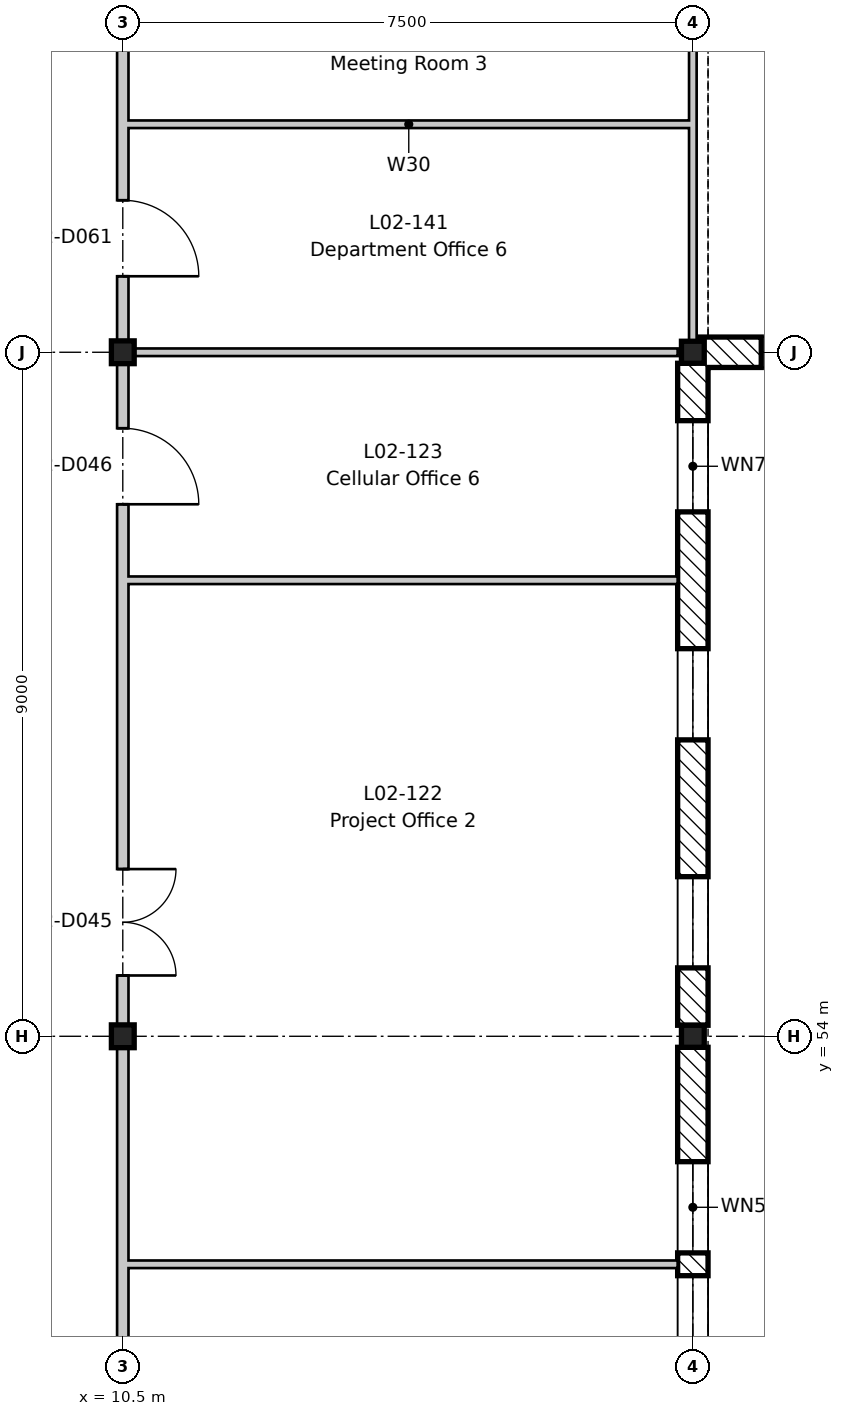
"""IFC4 building model, lengths in metres.
Left out: names, types, materials, properties, quantities, classifications, styles, units other than length and angle.
Written with IfcOpenShell. Run it as: python <this file> out.ifc"""

import sys

from ifc_helpers import new_model, si_unit, direction, frame, frame_2d, origin, origin_2d, place, context, subcontext, project, spatial, rectangle, i_section, extrude, element, fill, save


model = new_model("IFC4")
c1 = context("Model", 3, precision=1e-05, world=origin(), true_north=direction((0.0, 1.0)))
c2 = subcontext(c1, "Body", "Model", "MODEL_VIEW")
j1 = project(units=[si_unit("LENGTHUNIT", "METRE"), si_unit("PLANEANGLEUNIT", "RADIAN")], contexts=[c1])
p1 = place(None, origin())
s1 = spatial("IfcSite", under=j1, at=p1, CompositionType="ELEMENT")
p2 = place(p1, origin())
s2 = spatial("IfcBuilding", under=s1, at=p2, CompositionType="ELEMENT")
p3 = place(p2, frame((0.0, 0.0, 9.9)))
s3 = spatial("IfcBuildingStorey", under=s2, at=p3, CompositionType="ELEMENT", Elevation=9.9)
for number, where, z_axis, x_axis in (
    (1, (10.5, 54.0, -0.2), (0.0, 0.0, 1.0), (1.0, 0.0, 0.0)),
    (2, (10.5, 63.0, -0.2), (0.0, 0.0, 1.0), (1.0, 0.0, 0.0)),
):
    element("IfcColumn", number, at=place(p3, frame(where, z_axis=z_axis, x_axis=x_axis)), inside=s3, PredefinedType="COLUMN", context=c2, shape_type="SweptSolid", body=[
        extrude(i_section(OverallWidth=0.3, OverallDepth=0.3, WebThickness=0.011, FlangeThickness=0.019, FilletRadius=0.027, at=origin_2d()), origin(), (0.0, 0.0, 1.0), 4.5),
    ])
for number, where, z_axis, x_axis in (
    (3, (18.0, 54.0, -0.2), (0.0, 0.0, 1.0), (1.0, 0.0, 0.0)),
    (4, (18.0, 63.0, -0.2), (0.0, 0.0, 1.0), (1.0, 0.0, 0.0)),
):
    element("IfcColumn", number, at=place(p3, frame(where, z_axis=z_axis, x_axis=x_axis)), inside=s3, PredefinedType="COLUMN", context=c2, shape_type="SweptSolid", body=[
        extrude(i_section(OverallWidth=0.3, OverallDepth=0.29, WebThickness=0.009, FlangeThickness=0.014, FilletRadius=0.027, at=origin_2d()), origin(), (0.0, 0.0, 1.0), 4.5),
    ])
p4 = place(p3, frame((18.0, 53.855, 0.0), z_axis=(0.0, 0.0, 1.0), x_axis=(0.0, -1.0, 0.0)))
e5 = element("IfcWall", 5, at=p4, inside=s3, PredefinedType="STANDARD", context=c2, shape_type="SweptSolid", body=[
    extrude(rectangle(XDim=8.71, YDim=0.4, at=frame_2d((4.355, 0.0))), origin(), (0.0, 0.0, 1.0), 3.9),
])
p5 = place(p4, frame((6.005, 0.0, 0.6)))
e6 = element("IfcOpeningElement", 6, at=p5, cuts=e5, PredefinedType="OPENING", context=c2, shape_type="SweptSolid", body=[
    extrude(rectangle(XDim=1.2, YDim=3.0, at=frame_2d((0.6, 1.5))), frame((0.0, 0.21, 0.0), z_axis=(0.0, -1.0, 0.0), x_axis=(1.0, 0.0, 0.0)), (0.0, 0.0, 1.0), 0.42),
])
p6 = place(p4, frame((4.505, 0.0, 0.6)))
e7 = element("IfcOpeningElement", 7, at=p6, cuts=e5, PredefinedType="OPENING", context=c2, shape_type="SweptSolid", body=[
    extrude(rectangle(XDim=1.2, YDim=3.0, at=frame_2d((0.6, 1.5))), frame((0.0, 0.21, 0.0), z_axis=(0.0, -1.0, 0.0), x_axis=(1.0, 0.0, 0.0)), (0.0, 0.0, 1.0), 0.42),
])
p7 = place(p4, frame((3.005, 0.0, 0.6)))
e8 = element("IfcOpeningElement", 8, at=p7, cuts=e5, PredefinedType="OPENING", context=c2, shape_type="SweptSolid", body=[
    extrude(rectangle(XDim=1.2, YDim=3.0, at=frame_2d((0.6, 1.5))), frame((0.0, 0.21, 0.0), z_axis=(0.0, -1.0, 0.0), x_axis=(1.0, 0.0, 0.0)), (0.0, 0.0, 1.0), 0.42),
])
p8 = place(p4, frame((1.505, 0.0, 0.6)))
e9 = element("IfcOpeningElement", 9, at=p8, cuts=e5, PredefinedType="OPENING", context=c2, shape_type="SweptSolid", body=[
    extrude(rectangle(XDim=1.2, YDim=3.0, at=frame_2d((0.6, 1.5))), frame((0.0, 0.21, 0.0), z_axis=(0.0, -1.0, 0.0), x_axis=(1.0, 0.0, 0.0)), (0.0, 0.0, 1.0), 0.42),
])
p9 = place(p3, frame((18.0, 62.855, 0.0), z_axis=(0.0, 0.0, 1.0), x_axis=(0.0, -1.0, 0.0)))
e10 = element("IfcWall", 10, at=p9, inside=s3, PredefinedType="STANDARD", context=c2, shape_type="SweptSolid", body=[
    extrude(rectangle(XDim=8.71, YDim=0.4, at=frame_2d((4.355, 0.0))), origin(), (0.0, 0.0, 1.0), 3.9),
])
p10 = place(p9, frame((6.755, 0.0, 0.9)))
e11 = element("IfcOpeningElement", 11, at=p10, cuts=e10, PredefinedType="OPENING", context=c2, shape_type="SweptSolid", body=[
    extrude(rectangle(XDim=1.2, YDim=2.4, at=frame_2d((0.6, 1.2))), frame((0.0, 0.21, 0.0), z_axis=(0.0, -1.0, 0.0), x_axis=(1.0, 0.0, 0.0)), (0.0, 0.0, 1.0), 0.42),
])
p11 = place(p9, frame((3.755, 0.0, 0.9)))
e12 = element("IfcOpeningElement", 12, at=p11, cuts=e10, PredefinedType="OPENING", context=c2, shape_type="SweptSolid", body=[
    extrude(rectangle(XDim=1.2, YDim=2.4, at=frame_2d((0.6, 1.2))), frame((0.0, 0.21, 0.0), z_axis=(0.0, -1.0, 0.0), x_axis=(1.0, 0.0, 0.0)), (0.0, 0.0, 1.0), 0.42),
])
p12 = place(p9, frame((0.755, 0.0, 0.9)))
e13 = element("IfcOpeningElement", 13, at=p12, cuts=e10, PredefinedType="OPENING", context=c2, shape_type="SweptSolid", body=[
    extrude(rectangle(XDim=1.2, YDim=2.4, at=frame_2d((0.6, 1.2))), frame((0.0, 0.21, 0.0), z_axis=(0.0, -1.0, 0.0), x_axis=(1.0, 0.0, 0.0)), (0.0, 0.0, 1.0), 0.42),
])
p13 = place(p3, frame((26.991, 63.0, 0.0), z_axis=(0.0, 0.0, 1.0), x_axis=(-1.0, 0.0, 0.0)))
e14 = element("IfcWall", 14, at=p13, inside=s3, PredefinedType="STANDARD", context=c2, shape_type="SweptSolid", body=[
    extrude(rectangle(XDim=8.982, YDim=0.4, at=frame_2d((4.491, 0.0))), origin(), (0.0, 0.0, 1.0), 3.9),
])
p14 = place(p13, frame((6.891, 0.0, 0.9)))
e15 = element("IfcOpeningElement", 15, at=p14, cuts=e14, PredefinedType="OPENING", context=c2, shape_type="SweptSolid", body=[
    extrude(rectangle(XDim=1.2, YDim=2.4, at=frame_2d((0.6, 1.2))), frame((0.0, 0.21, 0.0), z_axis=(0.0, -1.0, 0.0), x_axis=(1.0, 0.0, 0.0)), (0.0, 0.0, 1.0), 0.42),
])
p15 = place(p13, frame((3.891, 0.0, 0.9)))
e16 = element("IfcOpeningElement", 16, at=p15, cuts=e14, PredefinedType="OPENING", context=c2, shape_type="SweptSolid", body=[
    extrude(rectangle(XDim=1.2, YDim=2.4, at=frame_2d((0.6, 1.2))), frame((0.0, 0.21, 0.0), z_axis=(0.0, -1.0, 0.0), x_axis=(1.0, 0.0, 0.0)), (0.0, 0.0, 1.0), 0.42),
])
p16 = place(p13, frame((0.891, 0.0, 0.9)))
e17 = element("IfcOpeningElement", 17, at=p16, cuts=e14, PredefinedType="OPENING", context=c2, shape_type="SweptSolid", body=[
    extrude(rectangle(XDim=1.2, YDim=2.4, at=frame_2d((0.6, 1.2))), frame((0.0, 0.21, 0.0), z_axis=(0.0, -1.0, 0.0), x_axis=(1.0, 0.0, 0.0)), (0.0, 0.0, 1.0), 0.42),
])
for number, where, z_axis, x_axis in (
    (18, (10.575, 51.0, 0.0), (0.0, 0.0, 1.0), (1.0, 0.0, 0.0)),
    (19, (10.575, 60.0, 0.0), (0.0, 0.0, 1.0), (1.0, 0.0, 0.0)),
):
    element("IfcWall", number, at=place(p3, frame(where, z_axis=z_axis, x_axis=x_axis)), inside=s3, PredefinedType="PARTITIONING", context=c2, shape_type="SweptSolid", body=[
        extrude(rectangle(XDim=7.225, YDim=0.1, at=frame_2d((3.613, 0.0))), origin(), (0.0, 0.0, 1.0), 4.3),
    ])
p17 = place(p3, frame((10.575, 63.0, 0.0), z_axis=(0.0, 0.0, 1.0), x_axis=(1.0, 0.0, 0.0)))
e20 = element("IfcWall", 20, at=p17, inside=s3, PredefinedType="PARTITIONING", context=c2, shape_type="SweptSolid", body=[
    extrude(rectangle(XDim=7.225, YDim=0.1, at=frame_2d((3.613, 0.0))), origin(), (0.0, 0.0, 1.0), 3.95),
])
p18 = place(p3, frame((10.5, -8.8, 0.0), z_axis=(0.0, 0.0, 1.0), x_axis=(0.0, 1.0, 0.0)))
e21 = element("IfcWall", 21, at=p18, inside=s3, PredefinedType="PARTITIONING", context=c2, shape_type="SweptSolid", body=[
    extrude(rectangle(XDim=79.3, YDim=0.15, at=frame_2d((39.65, 0.0))), origin(), (0.0, 0.0, 1.0), 3.78),
])
p19 = place(p18, frame((0.8, 0.0, 0.0)))
e22 = element("IfcOpeningElement", 22, at=p19, cuts=e21, PredefinedType="OPENING", context=c2, shape_type="SweptSolid", body=[
    extrude(rectangle(XDim=1.0, YDim=2.1, at=frame_2d((0.5, 1.05))), frame((0.0, 0.085, 0.0), z_axis=(0.0, -1.0, 0.0), x_axis=(1.0, 0.0, 0.0)), (0.0, 0.0, 1.0), 0.17),
])
p20 = place(p18, frame((5.3, 0.0, 0.0)))
e23 = element("IfcOpeningElement", 23, at=p20, cuts=e21, PredefinedType="OPENING", context=c2, shape_type="SweptSolid", body=[
    extrude(rectangle(XDim=1.0, YDim=2.1, at=frame_2d((0.5, 1.05))), frame((0.0, 0.085, 0.0), z_axis=(0.0, -1.0, 0.0), x_axis=(1.0, 0.0, 0.0)), (0.0, 0.0, 1.0), 0.17),
])
p21 = place(p18, frame((9.8, 0.0, 0.0)))
e24 = element("IfcOpeningElement", 24, at=p21, cuts=e21, PredefinedType="OPENING", context=c2, shape_type="SweptSolid", body=[
    extrude(rectangle(XDim=1.0, YDim=2.1, at=frame_2d((0.5, 1.05))), frame((0.0, 0.085, 0.0), z_axis=(0.0, -1.0, 0.0), x_axis=(1.0, 0.0, 0.0)), (0.0, 0.0, 1.0), 0.17),
])
p22 = place(p18, frame((12.8, 0.0, 0.0)))
e25 = element("IfcOpeningElement", 25, at=p22, cuts=e21, PredefinedType="OPENING", context=c2, shape_type="SweptSolid", body=[
    extrude(rectangle(XDim=1.0, YDim=2.1, at=frame_2d((0.5, 1.05))), frame((0.0, 0.085, 0.0), z_axis=(0.0, -1.0, 0.0), x_axis=(1.0, 0.0, 0.0)), (0.0, 0.0, 1.0), 0.17),
])
p23 = place(p18, frame((15.8, 0.0, 0.0)))
e26 = element("IfcOpeningElement", 26, at=p23, cuts=e21, PredefinedType="OPENING", context=c2, shape_type="SweptSolid", body=[
    extrude(rectangle(XDim=1.0, YDim=2.1, at=frame_2d((0.5, 1.05))), frame((0.0, 0.085, 0.0), z_axis=(0.0, -1.0, 0.0), x_axis=(1.0, 0.0, 0.0)), (0.0, 0.0, 1.0), 0.17),
])
p24 = place(p18, frame((20.3, 0.0, 0.0)))
e27 = element("IfcOpeningElement", 27, at=p24, cuts=e21, PredefinedType="OPENING", context=c2, shape_type="SweptSolid", body=[
    extrude(rectangle(XDim=1.0, YDim=2.1, at=frame_2d((0.5, 1.05))), frame((0.0, 0.085, 0.0), z_axis=(0.0, -1.0, 0.0), x_axis=(1.0, 0.0, 0.0)), (0.0, 0.0, 1.0), 0.17),
])
p25 = place(p18, frame((24.8, 0.0, 0.0)))
e28 = element("IfcOpeningElement", 28, at=p25, cuts=e21, PredefinedType="OPENING", context=c2, shape_type="SweptSolid", body=[
    extrude(rectangle(XDim=1.0, YDim=2.1, at=frame_2d((0.5, 1.05))), frame((0.0, 0.085, 0.0), z_axis=(0.0, -1.0, 0.0), x_axis=(1.0, 0.0, 0.0)), (0.0, 0.0, 1.0), 0.17),
])
p26 = place(p18, frame((27.8, 0.0, 0.0)))
e29 = element("IfcOpeningElement", 29, at=p26, cuts=e21, PredefinedType="OPENING", context=c2, shape_type="SweptSolid", body=[
    extrude(rectangle(XDim=1.0, YDim=2.1, at=frame_2d((0.5, 1.05))), frame((0.0, 0.085, 0.0), z_axis=(0.0, -1.0, 0.0), x_axis=(1.0, 0.0, 0.0)), (0.0, 0.0, 1.0), 0.17),
])
p27 = place(p18, frame((32.3, 0.0, 0.0)))
e30 = element("IfcOpeningElement", 30, at=p27, cuts=e21, PredefinedType="OPENING", context=c2, shape_type="SweptSolid", body=[
    extrude(rectangle(XDim=1.0, YDim=2.1, at=frame_2d((0.5, 1.05))), frame((0.0, 0.085, 0.0), z_axis=(0.0, -1.0, 0.0), x_axis=(1.0, 0.0, 0.0)), (0.0, 0.0, 1.0), 0.17),
])
p28 = place(p18, frame((38.3, 0.0, 0.0)))
e31 = element("IfcOpeningElement", 31, at=p28, cuts=e21, PredefinedType="OPENING", context=c2, shape_type="SweptSolid", body=[
    extrude(rectangle(XDim=1.0, YDim=2.1, at=frame_2d((0.5, 1.05))), frame((0.0, 0.085, 0.0), z_axis=(0.0, -1.0, 0.0), x_axis=(1.0, 0.0, 0.0)), (0.0, 0.0, 1.0), 0.17),
])
p29 = place(p18, frame((42.8, 0.0, 0.0)))
e32 = element("IfcOpeningElement", 32, at=p29, cuts=e21, PredefinedType="OPENING", context=c2, shape_type="SweptSolid", body=[
    extrude(rectangle(XDim=1.0, YDim=2.1, at=frame_2d((0.5, 1.05))), frame((0.0, 0.085, 0.0), z_axis=(0.0, -1.0, 0.0), x_axis=(1.0, 0.0, 0.0)), (0.0, 0.0, 1.0), 0.17),
])
p30 = place(p18, frame((45.8, 0.0, 0.0)))
e33 = element("IfcOpeningElement", 33, at=p30, cuts=e21, PredefinedType="OPENING", context=c2, shape_type="SweptSolid", body=[
    extrude(rectangle(XDim=1.0, YDim=2.1, at=frame_2d((0.5, 1.05))), frame((0.0, 0.085, 0.0), z_axis=(0.0, -1.0, 0.0), x_axis=(1.0, 0.0, 0.0)), (0.0, 0.0, 1.0), 0.17),
])
p31 = place(p18, frame((50.3, 0.0, 0.0)))
e34 = element("IfcOpeningElement", 34, at=p31, cuts=e21, PredefinedType="OPENING", context=c2, shape_type="SweptSolid", body=[
    extrude(rectangle(XDim=1.0, YDim=2.1, at=frame_2d((0.5, 1.05))), frame((0.0, 0.085, 0.0), z_axis=(0.0, -1.0, 0.0), x_axis=(1.0, 0.0, 0.0)), (0.0, 0.0, 1.0), 0.17),
])
p32 = place(p18, frame((54.8, 0.0, 0.0)))
e35 = element("IfcOpeningElement", 35, at=p32, cuts=e21, PredefinedType="OPENING", context=c2, shape_type="SweptSolid", body=[
    extrude(rectangle(XDim=1.0, YDim=2.1, at=frame_2d((0.5, 1.05))), frame((0.0, 0.085, 0.0), z_axis=(0.0, -1.0, 0.0), x_axis=(1.0, 0.0, 0.0)), (0.0, 0.0, 1.0), 0.17),
])
p33 = place(p18, frame((57.8, 0.0, 0.0)))
e36 = element("IfcOpeningElement", 36, at=p33, cuts=e21, PredefinedType="OPENING", context=c2, shape_type="SweptSolid", body=[
    extrude(rectangle(XDim=1.0, YDim=2.1, at=frame_2d((0.5, 1.05))), frame((0.0, 0.085, 0.0), z_axis=(0.0, -1.0, 0.0), x_axis=(1.0, 0.0, 0.0)), (0.0, 0.0, 1.0), 0.17),
])
p34 = place(p18, frame((63.6, 0.0, 0.0)))
e37 = element("IfcOpeningElement", 37, at=p34, cuts=e21, PredefinedType="OPENING", context=c2, shape_type="SweptSolid", body=[
    extrude(rectangle(XDim=1.4, YDim=2.1, at=frame_2d((0.7, 1.05))), frame((0.0, 0.085, 0.0), z_axis=(0.0, -1.0, 0.0), x_axis=(1.0, 0.0, 0.0)), (0.0, 0.0, 1.0), 0.17),
])
p35 = place(p18, frame((69.8, 0.0, 0.0)))
e38 = element("IfcOpeningElement", 38, at=p35, cuts=e21, PredefinedType="OPENING", context=c2, shape_type="SweptSolid", body=[
    extrude(rectangle(XDim=1.0, YDim=2.1, at=frame_2d((0.5, 1.05))), frame((0.0, 0.085, 0.0), z_axis=(0.0, -1.0, 0.0), x_axis=(1.0, 0.0, 0.0)), (0.0, 0.0, 1.0), 0.17),
])
p36 = place(p18, frame((72.8, 0.0, 0.0)))
e39 = element("IfcOpeningElement", 39, at=p36, cuts=e21, PredefinedType="OPENING", context=c2, shape_type="SweptSolid", body=[
    extrude(rectangle(XDim=1.0, YDim=2.1, at=frame_2d((0.5, 1.05))), frame((0.0, 0.085, 0.0), z_axis=(0.0, -1.0, 0.0), x_axis=(1.0, 0.0, 0.0)), (0.0, 0.0, 1.0), 0.17),
])
p37 = place(p3, frame((10.575, 66.0, 0.0), z_axis=(0.0, 0.0, 1.0), x_axis=(1.0, 0.0, 0.0)))
e40 = element("IfcWall", 40, at=p37, inside=s3, PredefinedType="PARTITIONING", context=c2, shape_type="SweptSolid", body=[
    extrude(rectangle(XDim=7.375, YDim=0.1, at=frame_2d((3.688, 0.0))), origin(), (0.0, 0.0, 1.0), 4.3),
])
p38 = place(p3, frame((18.0, 63.075, 0.0), z_axis=(0.0, 0.0, 1.0), x_axis=(0.0, 1.0, 0.0)))
e41 = element("IfcWall", 41, at=p38, inside=s3, PredefinedType="PARTITIONING", context=c2, shape_type="SweptSolid", body=[
    extrude(rectangle(XDim=7.35, YDim=0.1, at=frame_2d((3.675, 0.0))), origin(), (0.0, 0.0, 1.0), 3.88),
])
p39 = place(p7, origin())
e42 = element("IfcWindow", 42, at=p39, inside=s3, PartitioningType="SINGLE_PANEL", PredefinedType="WINDOW", context=c2, shape_type="SweptSolid", body=[
    extrude(rectangle(XDim=1.2, YDim=3.0, at=frame_2d((0.6, 1.5))), frame((0.0, 0.03, 0.0), z_axis=(0.0, -1.0, 0.0), x_axis=(1.0, 0.0, 0.0)), (0.0, 0.0, 1.0), 0.06),
])
fill(e8, e42)
p40 = place(p8, origin())
e43 = element("IfcWindow", 43, at=p40, inside=s3, PartitioningType="SINGLE_PANEL", PredefinedType="WINDOW", context=c2, shape_type="SweptSolid", body=[
    extrude(rectangle(XDim=1.2, YDim=3.0, at=frame_2d((0.6, 1.5))), frame((0.0, 0.03, 0.0), z_axis=(0.0, -1.0, 0.0), x_axis=(1.0, 0.0, 0.0)), (0.0, 0.0, 1.0), 0.06),
])
fill(e9, e43)
p41 = place(p10, origin())
e44 = element("IfcWindow", 44, at=p41, inside=s3, PartitioningType="SINGLE_PANEL", PredefinedType="WINDOW", context=c2, shape_type="SweptSolid", body=[
    extrude(rectangle(XDim=1.2, YDim=2.4, at=frame_2d((0.6, 1.2))), frame((0.0, -0.12, 0.0), z_axis=(0.0, -1.0, 0.0), x_axis=(1.0, 0.0, 0.0)), (0.0, 0.0, 1.0), 0.06),
])
fill(e11, e44)
p42 = place(p11, origin())
e45 = element("IfcWindow", 45, at=p42, inside=s3, PartitioningType="SINGLE_PANEL", PredefinedType="WINDOW", context=c2, shape_type="SweptSolid", body=[
    extrude(rectangle(XDim=1.2, YDim=2.4, at=frame_2d((0.6, 1.2))), frame((0.0, -0.12, 0.0), z_axis=(0.0, -1.0, 0.0), x_axis=(1.0, 0.0, 0.0)), (0.0, 0.0, 1.0), 0.06),
])
fill(e12, e45)
p43 = place(p12, origin())
e46 = element("IfcWindow", 46, at=p43, inside=s3, PartitioningType="SINGLE_PANEL", PredefinedType="WINDOW", context=c2, shape_type="SweptSolid", body=[
    extrude(rectangle(XDim=1.2, YDim=2.4, at=frame_2d((0.6, 1.2))), frame((0.0, -0.12, 0.0), z_axis=(0.0, -1.0, 0.0), x_axis=(1.0, 0.0, 0.0)), (0.0, 0.0, 1.0), 0.06),
])
fill(e13, e46)
p44 = place(p14, origin())
e47 = element("IfcWindow", 47, at=p44, inside=s3, PartitioningType="SINGLE_PANEL", PredefinedType="WINDOW", context=c2, shape_type="SweptSolid", body=[
    extrude(rectangle(XDim=1.2, YDim=2.4, at=frame_2d((0.6, 1.2))), frame((0.0, -0.12, 0.0), z_axis=(0.0, -1.0, 0.0), x_axis=(1.0, 0.0, 0.0)), (0.0, 0.0, 1.0), 0.06),
])
fill(e15, e47)
p45 = place(p34, frame((1.4, 0.0, 0.0), z_axis=(0.0, 0.0, 1.0), x_axis=(-1.0, 0.0, 0.0)))
e48 = element("IfcDoor", 48, at=p45, inside=s3, OperationType="DOUBLE_DOOR_SINGLE_SWING", PredefinedType="DOOR", context=c2, shape_type="SweptSolid", body=[
    extrude(rectangle(XDim=1.4, YDim=2.1, at=frame_2d((0.7, 1.05))), frame((0.0, 0.025, 0.0), z_axis=(0.0, -1.0, 0.0), x_axis=(1.0, 0.0, 0.0)), (0.0, 0.0, 1.0), 0.05),
])
fill(e37, e48)
p46 = place(p35, frame((1.0, 0.0, 0.0), z_axis=(0.0, 0.0, 1.0), x_axis=(-1.0, 0.0, 0.0)))
e49 = element("IfcDoor", 49, at=p46, inside=s3, OperationType="SINGLE_SWING_RIGHT", PredefinedType="DOOR", context=c2, shape_type="SweptSolid", body=[
    extrude(rectangle(XDim=1.0, YDim=2.1, at=frame_2d((0.5, 1.05))), frame((0.0, 0.025, 0.0), z_axis=(0.0, -1.0, 0.0), x_axis=(1.0, 0.0, 0.0)), (0.0, 0.0, 1.0), 0.05),
])
fill(e38, e49)
p47 = place(p36, frame((1.0, 0.0, 0.0), z_axis=(0.0, 0.0, 1.0), x_axis=(-1.0, 0.0, 0.0)))
e50 = element("IfcDoor", 50, at=p47, inside=s3, OperationType="SINGLE_SWING_RIGHT", PredefinedType="DOOR", context=c2, shape_type="SweptSolid", body=[
    extrude(rectangle(XDim=1.0, YDim=2.1, at=frame_2d((0.5, 1.05))), frame((0.0, 0.025, 0.0), z_axis=(0.0, -1.0, 0.0), x_axis=(1.0, 0.0, 0.0)), (0.0, 0.0, 1.0), 0.05),
])
fill(e39, e50)
save(model, sys.argv[1])
